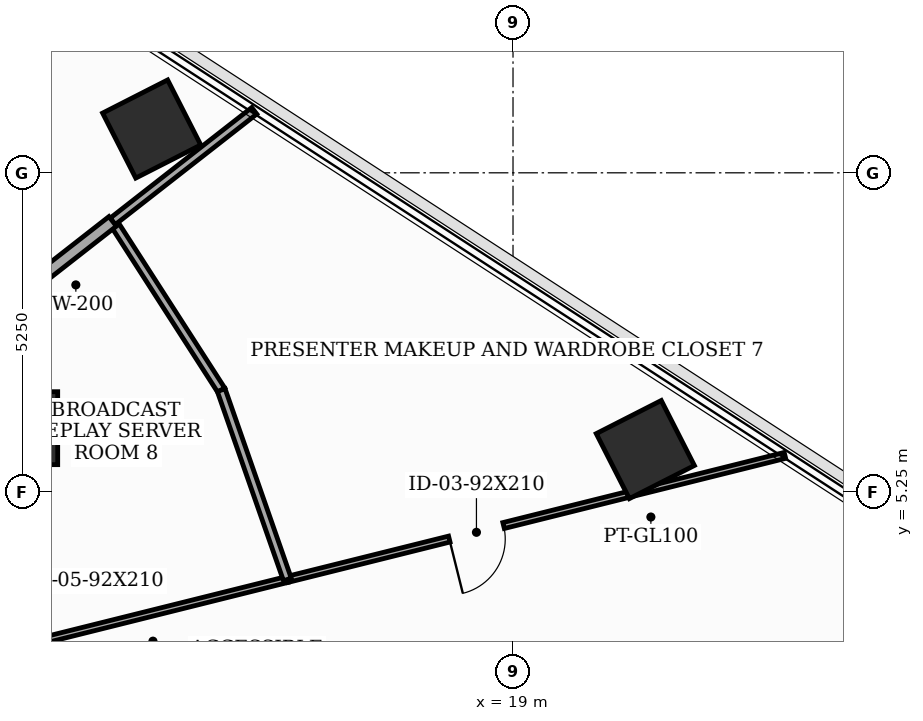
"""IFC4 building model, lengths in metres.
Left out: names, types, materials, properties, quantities, classifications, styles, units other than length and angle.
Written with IfcOpenShell. Run it as: python <this file> out.ifc"""

import sys

from ifc_helpers import new_model, si_unit, direction, frame, frame_2d, origin, origin_2d, place, context, subcontext, project, spatial, rectangle, extrude, element, fill, save


model = new_model("IFC4")
c1 = context("Model", 3, precision=1e-05, world=origin(), true_north=direction((0.0, 1.0)))
c2 = subcontext(c1, "Body", "Model", "MODEL_VIEW")
j1 = project(units=[si_unit("LENGTHUNIT", "METRE"), si_unit("PLANEANGLEUNIT", "RADIAN")], contexts=[c1])
p1 = place(None, origin())
s1 = spatial("IfcSite", under=j1, at=p1, CompositionType="ELEMENT")
p2 = place(p1, origin())
s2 = spatial("IfcBuilding", under=s1, at=p2, CompositionType="ELEMENT")
p3 = place(p2, frame((0.0, 0.0, 127.3)))
s3 = spatial("IfcBuildingStorey", under=s2, at=p3, CompositionType="ELEMENT", Elevation=127.3)
for number, where, z_axis, x_axis in (
    (1, (10.912, 6.3, 0.0), (0.0, 0.0, 1.0), (1.0, 0.0, 0.0)),
    (2, (21.176, 5.948, 0.0), (0.0, 0.0, 1.0), (0.891, 0.454, 0.0)),
    (3, (13.058, 11.22, 0.0), (0.0, 0.0, 1.0), (0.891, 0.454, 0.0)),
):
    element("IfcColumn", number, at=place(p3, frame(where, z_axis=z_axis, x_axis=x_axis)), inside=s3, PredefinedType="COLUMN", context=c2, shape_type="SweptSolid", body=[
        extrude(rectangle(XDim=1.2, YDim=1.2, at=origin_2d()), origin(), (0.0, 0.0, 1.0), 3.7),
    ])
p4 = place(p3, frame((23.472, 5.852, 0.0), z_axis=(0.0, 0.0, 1.0), x_axis=(-0.970293868859, -0.24192934517, 0.0)))
e4 = element("IfcWall", 4, at=p4, inside=s3, PredefinedType="MOVABLE", context=c2, shape_type="SweptSolid", body=[
    extrude(rectangle(XDim=8.433, YDim=0.1, at=frame_2d((4.217, 0.0))), origin(), (0.0, 0.0, 1.0), 2.985),
])
p5 = place(p4, frame((4.769, 0.0, 0.0)))
e5 = element("IfcOpeningElement", 5, at=p5, cuts=e4, PredefinedType="OPENING", context=c2, shape_type="SweptSolid", body=[
    extrude(rectangle(XDim=0.92, YDim=2.1, at=frame_2d((0.46, 1.05))), frame((0.0, 0.06, 0.0), z_axis=(0.0, -1.0, 0.0), x_axis=(1.0, 0.0, 0.0)), (0.0, 0.0, 1.0), 0.12),
])
p6 = place(p3, frame((15.289, 3.812, 0.0), z_axis=(0.0, 0.0, 1.0), x_axis=(-0.970280510542, -0.241982914402, 0.0)))
e6 = element("IfcWall", 6, at=p6, inside=s3, PredefinedType="MOVABLE", context=c2, shape_type="SweptSolid", body=[
    extrude(rectangle(XDim=4.781, YDim=0.1, at=frame_2d((2.391, 0.0))), origin(), (0.0, 0.0, 1.0), 2.785),
])
p7 = place(p3, frame((12.416, 9.701, 0.0), z_axis=(0.0, 0.0, 1.0), x_axis=(0.540981963117, -0.841034194062, 0.0)))
e7 = element("IfcWall", 7, at=p7, inside=s3, PredefinedType="PARTITIONING", context=c2, shape_type="SweptSolid", body=[
    extrude(rectangle(XDim=3.299, YDim=0.135, at=frame_2d((1.65, 0.0))), origin(), (0.0, 0.0, 1.0), 2.885),
])
p8 = place(p3, frame((14.201, 6.926, 0.0), z_axis=(0.0, 0.0, 1.0), x_axis=(0.329872352593, -0.944025545732, 0.0)))
e8 = element("IfcWall", 8, at=p8, inside=s3, PredefinedType="PARTITIONING", context=c2, shape_type="SweptSolid", body=[
    extrude(rectangle(XDim=3.299, YDim=0.135, at=frame_2d((1.649, 0.0))), origin(), (0.0, 0.0, 1.0), 2.885),
])
p9 = place(p3, frame((14.744, 11.52, 0.0), z_axis=(0.0, 0.0, 1.0), x_axis=(-0.788015604839, -0.615655265981, 0.0)))
e9 = element("IfcWall", 9, at=p9, inside=s3, PredefinedType="PARTITIONING", context=c2, shape_type="SweptSolid", body=[
    extrude(rectangle(XDim=2.955, YDim=0.135, at=frame_2d((1.478, 0.0))), origin(), (0.0, 0.0, 1.0), 2.885),
])
p10 = place(p3, frame((12.416, 9.701, 0.0), z_axis=(0.0, 0.0, 1.0), x_axis=(-0.788001252745, -0.615673635681, 0.0)))
e10 = element("IfcWall", 10, at=p10, inside=s3, PredefinedType="SOLIDWALL", context=c2, shape_type="SweptSolid", body=[
    extrude(rectangle(XDim=2.241, YDim=0.2, at=frame_2d((1.121, 0.0))), origin(), (0.0, 0.0, 1.0), 2.885),
])
p11 = place(p5, origin())
e11 = element("IfcDoor", 11, at=p11, inside=s3, OperationType="SINGLE_SWING_RIGHT", PredefinedType="DOOR", context=c2, shape_type="SweptSolid", body=[
    extrude(rectangle(XDim=0.92, YDim=2.1, at=frame_2d((0.46, 1.05))), frame((0.0, 0.025, 0.0), z_axis=(0.0, -1.0, 0.0), x_axis=(1.0, 0.0, 0.0)), (0.0, 0.0, 1.0), 0.05),
])
fill(e5, e11)
save(model, sys.argv[1])
